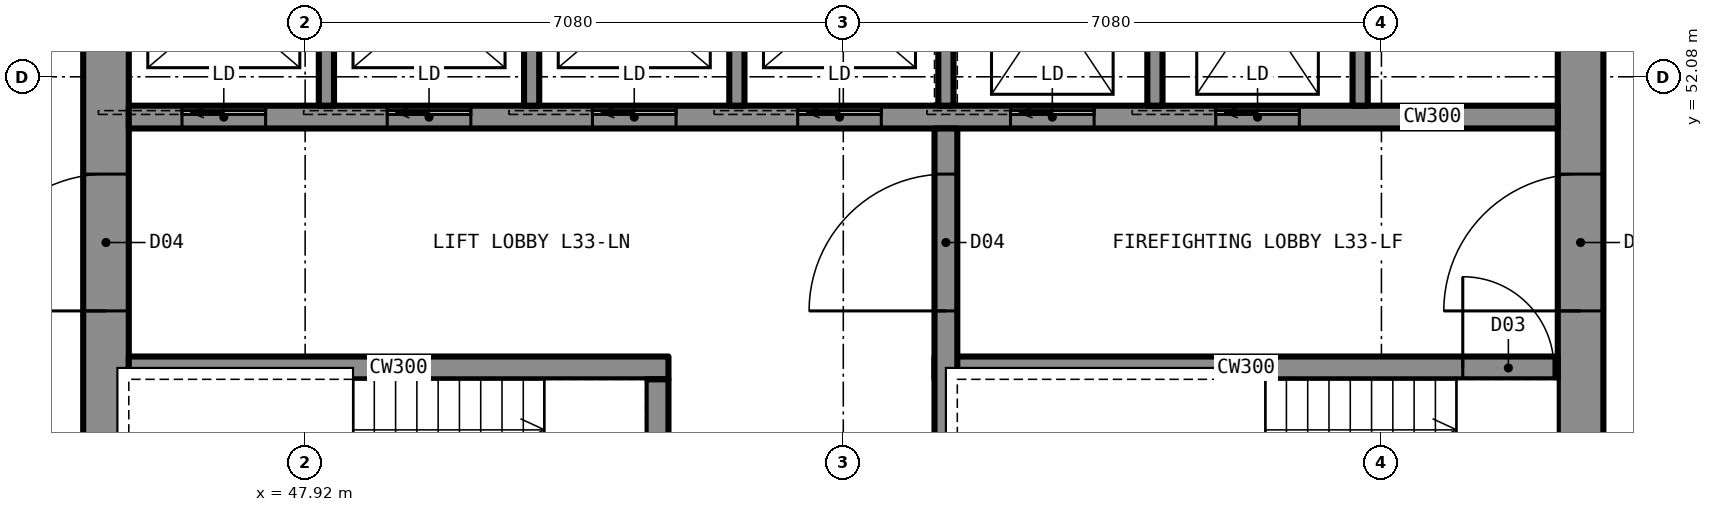
"""IFC4 building model, lengths in metres.
Left out: names, types, materials, properties, quantities, classifications, styles, units other than length and angle.
Written with IfcOpenShell. Run it as: python <this file> out.ifc"""

import sys

from ifc_helpers import new_model, si_unit, direction, frame, frame_2d, origin, place, context, subcontext, project, spatial, rectangle, extrude, element, fill, save


model = new_model("IFC4")
c1 = context("Model", 3, precision=1e-05, world=origin(), true_north=direction((0.0, 1.0)))
c2 = subcontext(c1, "Body", "Model", "MODEL_VIEW")
j1 = project(units=[si_unit("LENGTHUNIT", "METRE"), si_unit("PLANEANGLEUNIT", "RADIAN")], contexts=[c1])
p1 = place(None, origin())
s1 = spatial("IfcSite", under=j1, at=p1, CompositionType="ELEMENT")
p2 = place(p1, origin())
s2 = spatial("IfcBuilding", under=s1, at=p2, CompositionType="ELEMENT")
p3 = place(p2, frame((0.0, 0.0, 124.9)))
s3 = spatial("IfcBuildingStorey", under=s2, at=p3, CompositionType="ELEMENT", Elevation=124.9)
p4 = place(p3, frame((64.7, 35.6, 0.0), z_axis=(0.0, 0.0, 1.0), x_axis=(0.0, 1.0, 0.0)))
e1 = element("IfcWall", 1, at=p4, inside=s3, PredefinedType="SHEAR", context=c2, shape_type="SweptSolid", body=[
    extrude(rectangle(XDim=18.8, YDim=0.6, at=frame_2d((9.4, 0.0))), origin(), (0.0, 0.0, 1.0), 3.5),
])
p5 = place(p4, frame((13.4, 0.0, 0.0)))
e2 = element("IfcOpeningElement", 2, at=p5, cuts=e1, PredefinedType="OPENING", context=c2, shape_type="SweptSolid", body=[
    extrude(rectangle(XDim=1.8, YDim=2.2, at=frame_2d((0.9, 1.1))), frame((0.0, 0.31, 0.0), z_axis=(0.0, -1.0, 0.0), x_axis=(1.0, 0.0, 0.0)), (0.0, 0.0, 1.0), 0.62),
])
p6 = place(p4, frame((3.6, 0.0, 0.0)))
e3 = element("IfcOpeningElement", 3, at=p6, cuts=e1, PredefinedType="OPENING", context=c2, shape_type="SweptSolid", body=[
    extrude(rectangle(XDim=1.8, YDim=2.2, at=frame_2d((0.9, 1.1))), frame((0.0, 0.31, 0.0), z_axis=(0.0, -1.0, 0.0), x_axis=(1.0, 0.0, 0.0)), (0.0, 0.0, 1.0), 0.62),
])
p7 = place(p3, frame((45.3, 35.6, 0.0), z_axis=(0.0, 0.0, 1.0), x_axis=(0.0, 1.0, 0.0)))
e4 = element("IfcWall", 4, at=p7, inside=s3, PredefinedType="SHEAR", context=c2, shape_type="SweptSolid", body=[
    extrude(rectangle(XDim=18.8, YDim=0.6, at=frame_2d((9.4, 0.0))), origin(), (0.0, 0.0, 1.0), 3.5),
])
p8 = place(p7, frame((13.4, 0.0, 0.0)))
e5 = element("IfcOpeningElement", 5, at=p8, cuts=e4, PredefinedType="OPENING", context=c2, shape_type="SweptSolid", body=[
    extrude(rectangle(XDim=1.8, YDim=2.2, at=frame_2d((0.9, 1.1))), frame((0.0, 0.31, 0.0), z_axis=(0.0, -1.0, 0.0), x_axis=(1.0, 0.0, 0.0)), (0.0, 0.0, 1.0), 0.62),
])
p9 = place(p7, frame((3.6, 0.0, 0.0)))
e6 = element("IfcOpeningElement", 6, at=p9, cuts=e4, PredefinedType="OPENING", context=c2, shape_type="SweptSolid", body=[
    extrude(rectangle(XDim=1.8, YDim=2.2, at=frame_2d((0.9, 1.1))), frame((0.0, 0.31, 0.0), z_axis=(0.0, -1.0, 0.0), x_axis=(1.0, 0.0, 0.0)), (0.0, 0.0, 1.0), 0.62),
])
p10 = place(p7, frame((6.4, 0.0, 0.0)))
e7 = element("IfcOpeningElement", 7, at=p10, cuts=e4, PredefinedType="OPENING", context=c2, shape_type="SweptSolid", body=[
    extrude(rectangle(XDim=1.2, YDim=2.2, at=frame_2d((0.6, 1.1))), frame((0.0, 0.31, 0.0), z_axis=(0.0, -1.0, 0.0), x_axis=(1.0, 0.0, 0.0)), (0.0, 0.0, 1.0), 0.62),
])
p11 = place(p3, frame((45.6, 51.55, 0.0), z_axis=(0.0, 0.0, 1.0), x_axis=(1.0, 0.0, 0.0)))
e8 = element("IfcWall", 8, at=p11, inside=s3, PredefinedType="SHEAR", context=c2, shape_type="SweptSolid", body=[
    extrude(rectangle(XDim=18.8, YDim=0.3, at=frame_2d((9.4, 0.0))), origin(), (0.0, 0.0, 1.0), 3.5),
])
p12 = place(p11, frame((0.7, 0.0, 0.0)))
e9 = element("IfcOpeningElement", 9, at=p12, cuts=e8, PredefinedType="OPENING", context=c2, shape_type="SweptSolid", body=[
    extrude(rectangle(XDim=1.1, YDim=2.2, at=frame_2d((0.55, 1.1))), frame((0.0, 0.16, 0.0), z_axis=(0.0, -1.0, 0.0), x_axis=(1.0, 0.0, 0.0)), (0.0, 0.0, 1.0), 0.32),
])
p13 = place(p11, frame((3.4, 0.0, 0.0)))
e10 = element("IfcOpeningElement", 10, at=p13, cuts=e8, PredefinedType="OPENING", context=c2, shape_type="SweptSolid", body=[
    extrude(rectangle(XDim=1.1, YDim=2.2, at=frame_2d((0.55, 1.1))), frame((0.0, 0.16, 0.0), z_axis=(0.0, -1.0, 0.0), x_axis=(1.0, 0.0, 0.0)), (0.0, 0.0, 1.0), 0.32),
])
p14 = place(p11, frame((6.1, 0.0, 0.0)))
e11 = element("IfcOpeningElement", 11, at=p14, cuts=e8, PredefinedType="OPENING", context=c2, shape_type="SweptSolid", body=[
    extrude(rectangle(XDim=1.1, YDim=2.2, at=frame_2d((0.55, 1.1))), frame((0.0, 0.16, 0.0), z_axis=(0.0, -1.0, 0.0), x_axis=(1.0, 0.0, 0.0)), (0.0, 0.0, 1.0), 0.32),
])
p15 = place(p11, frame((8.8, 0.0, 0.0)))
e12 = element("IfcOpeningElement", 12, at=p15, cuts=e8, PredefinedType="OPENING", context=c2, shape_type="SweptSolid", body=[
    extrude(rectangle(XDim=1.1, YDim=2.2, at=frame_2d((0.55, 1.1))), frame((0.0, 0.16, 0.0), z_axis=(0.0, -1.0, 0.0), x_axis=(1.0, 0.0, 0.0)), (0.0, 0.0, 1.0), 0.32),
])
p16 = place(p11, frame((11.6, 0.0, 0.0)))
e13 = element("IfcOpeningElement", 13, at=p16, cuts=e8, PredefinedType="OPENING", context=c2, shape_type="SweptSolid", body=[
    extrude(rectangle(XDim=1.1, YDim=2.2, at=frame_2d((0.55, 1.1))), frame((0.0, 0.16, 0.0), z_axis=(0.0, -1.0, 0.0), x_axis=(1.0, 0.0, 0.0)), (0.0, 0.0, 1.0), 0.32),
])
p17 = place(p11, frame((14.3, 0.0, 0.0)))
e14 = element("IfcOpeningElement", 14, at=p17, cuts=e8, PredefinedType="OPENING", context=c2, shape_type="SweptSolid", body=[
    extrude(rectangle(XDim=1.1, YDim=2.2, at=frame_2d((0.55, 1.1))), frame((0.0, 0.16, 0.0), z_axis=(0.0, -1.0, 0.0), x_axis=(1.0, 0.0, 0.0)), (0.0, 0.0, 1.0), 0.32),
])
p18 = place(p3, frame((45.6, 48.25, 0.0), z_axis=(0.0, 0.0, 1.0), x_axis=(1.0, 0.0, 0.0)))
e15 = element("IfcWall", 15, at=p18, inside=s3, PredefinedType="SHEAR", context=c2, shape_type="SweptSolid", body=[
    extrude(rectangle(XDim=7.1, YDim=0.3, at=frame_2d((3.55, 0.0))), origin(), (0.0, 0.0, 1.0), 3.5),
])
p19 = place(p3, frame((56.2, 48.25, 0.0), z_axis=(0.0, 0.0, 1.0), x_axis=(1.0, 0.0, 0.0)))
e16 = element("IfcWall", 16, at=p19, inside=s3, PredefinedType="SHEAR", context=c2, shape_type="SweptSolid", body=[
    extrude(rectangle(XDim=8.2, YDim=0.3, at=frame_2d((4.1, 0.0))), origin(), (0.0, 0.0, 1.0), 3.5),
])
p20 = place(p19, frame((6.95, 0.0, 0.0)))
e17 = element("IfcOpeningElement", 17, at=p20, cuts=e16, PredefinedType="OPENING", context=c2, shape_type="SweptSolid", body=[
    extrude(rectangle(XDim=1.2, YDim=2.2, at=frame_2d((0.6, 1.1))), frame((0.0, 0.16, 0.0), z_axis=(0.0, -1.0, 0.0), x_axis=(1.0, 0.0, 0.0)), (0.0, 0.0, 1.0), 0.32),
])
p21 = place(p3, frame((52.55, 41.9, 0.0), z_axis=(0.0, 0.0, 1.0), x_axis=(0.0, 1.0, 0.0)))
e18 = element("IfcWall", 18, at=p21, inside=s3, PredefinedType="SHEAR", context=c2, shape_type="SweptSolid", body=[
    extrude(rectangle(XDim=6.2, YDim=0.3, at=frame_2d((3.1, 0.0))), origin(), (0.0, 0.0, 1.0), 3.5),
])
p22 = place(p21, frame((4.125, 0.0, 0.0)))
e19 = element("IfcOpeningElement", 19, at=p22, cuts=e18, PredefinedType="OPENING", context=c2, shape_type="SweptSolid", body=[
    extrude(rectangle(XDim=1.2, YDim=2.2, at=frame_2d((0.6, 1.1))), frame((0.0, 0.16, 0.0), z_axis=(0.0, -1.0, 0.0), x_axis=(1.0, 0.0, 0.0)), (0.0, 0.0, 1.0), 0.32),
])
p23 = place(p3, frame((56.35, 41.9, 0.0), z_axis=(0.0, 0.0, 1.0), x_axis=(0.0, 1.0, 0.0)))
e20 = element("IfcWall", 20, at=p23, inside=s3, PredefinedType="SHEAR", context=c2, shape_type="SweptSolid", body=[
    extrude(rectangle(XDim=9.5, YDim=0.3, at=frame_2d((4.75, 0.0))), origin(), (0.0, 0.0, 1.0), 3.5),
])
p24 = place(p23, frame((7.1, 0.0, 0.0)))
e21 = element("IfcOpeningElement", 21, at=p24, cuts=e20, PredefinedType="OPENING", context=c2, shape_type="SweptSolid", body=[
    extrude(rectangle(XDim=1.8, YDim=2.2, at=frame_2d((0.9, 1.1))), frame((0.0, 0.16, 0.0), z_axis=(0.0, -1.0, 0.0), x_axis=(1.0, 0.0, 0.0)), (0.0, 0.0, 1.0), 0.32),
])
for number, where, z_axis, x_axis in (
    (22, (48.2, 51.7, 0.0), (0.0, 0.0, 1.0), (0.0, 1.0, 0.0)),
    (23, (50.9, 51.7, 0.0), (0.0, 0.0, 1.0), (0.0, 1.0, 0.0)),
    (24, (53.6, 51.7, 0.0), (0.0, 0.0, 1.0), (0.0, 1.0, 0.0)),
    (25, (59.1, 51.7, 0.0), (0.0, 0.0, 1.0), (0.0, 1.0, 0.0)),
    (26, (61.8, 51.7, 0.0), (0.0, 0.0, 1.0), (0.0, 1.0, 0.0)),
    (27, (56.35, 51.7, 0.0), (0.0, 0.0, 1.0), (0.0, 1.0, 0.0)),
):
    element("IfcWall", number, at=place(p3, frame(where, z_axis=z_axis, x_axis=x_axis)), inside=s3, PredefinedType="PARTITIONING", context=c2, shape_type="SweptSolid", body=[
        extrude(rectangle(XDim=2.7, YDim=0.2, at=frame_2d((1.35, 0.0))), origin(), (0.0, 0.0, 1.0), 3.33),
    ])
p25 = place(p8, origin())
e28 = element("IfcDoor", 28, at=p25, inside=s3, OperationType="DOUBLE_DOOR_SINGLE_SWING", PredefinedType="DOOR", context=c2, shape_type="SweptSolid", body=[
    extrude(rectangle(XDim=1.8, YDim=2.2, at=frame_2d((0.9, 1.1))), frame((0.0, 0.025, 0.0), z_axis=(0.0, -1.0, 0.0), x_axis=(1.0, 0.0, 0.0)), (0.0, 0.0, 1.0), 0.05),
])
fill(e5, e28)
p26 = place(p5, origin())
e29 = element("IfcDoor", 29, at=p26, inside=s3, OperationType="DOUBLE_DOOR_SINGLE_SWING", PredefinedType="DOOR", context=c2, shape_type="SweptSolid", body=[
    extrude(rectangle(XDim=1.8, YDim=2.2, at=frame_2d((0.9, 1.1))), frame((0.0, 0.025, 0.0), z_axis=(0.0, -1.0, 0.0), x_axis=(1.0, 0.0, 0.0)), (0.0, 0.0, 1.0), 0.05),
])
fill(e2, e29)
p27 = place(p24, origin())
e30 = element("IfcDoor", 30, at=p27, inside=s3, OperationType="DOUBLE_DOOR_SINGLE_SWING", PredefinedType="DOOR", context=c2, shape_type="SweptSolid", body=[
    extrude(rectangle(XDim=1.8, YDim=2.2, at=frame_2d((0.9, 1.1))), frame((0.0, 0.025, 0.0), z_axis=(0.0, -1.0, 0.0), x_axis=(1.0, 0.0, 0.0)), (0.0, 0.0, 1.0), 0.05),
])
fill(e21, e30)
p28 = place(p20, origin())
e31 = element("IfcDoor", 31, at=p28, inside=s3, OperationType="SINGLE_SWING_LEFT", PredefinedType="DOOR", context=c2, shape_type="SweptSolid", body=[
    extrude(rectangle(XDim=1.2, YDim=2.2, at=frame_2d((0.6, 1.1))), frame((0.0, 0.025, 0.0), z_axis=(0.0, -1.0, 0.0), x_axis=(1.0, 0.0, 0.0)), (0.0, 0.0, 1.0), 0.05),
])
fill(e17, e31)
p29 = place(p12, origin())
e32 = element("IfcDoor", 32, at=p29, inside=s3, OperationType="SLIDING_TO_LEFT", PredefinedType="DOOR", context=c2, shape_type="SweptSolid", body=[
    extrude(rectangle(XDim=1.1, YDim=2.2, at=frame_2d((0.55, 1.1))), frame((0.0, 0.025, 0.0), z_axis=(0.0, -1.0, 0.0), x_axis=(1.0, 0.0, 0.0)), (0.0, 0.0, 1.0), 0.05),
])
fill(e9, e32)
p30 = place(p13, origin())
e33 = element("IfcDoor", 33, at=p30, inside=s3, OperationType="SLIDING_TO_LEFT", PredefinedType="DOOR", context=c2, shape_type="SweptSolid", body=[
    extrude(rectangle(XDim=1.1, YDim=2.2, at=frame_2d((0.55, 1.1))), frame((0.0, 0.025, 0.0), z_axis=(0.0, -1.0, 0.0), x_axis=(1.0, 0.0, 0.0)), (0.0, 0.0, 1.0), 0.05),
])
fill(e10, e33)
p31 = place(p14, origin())
e34 = element("IfcDoor", 34, at=p31, inside=s3, OperationType="SLIDING_TO_LEFT", PredefinedType="DOOR", context=c2, shape_type="SweptSolid", body=[
    extrude(rectangle(XDim=1.1, YDim=2.2, at=frame_2d((0.55, 1.1))), frame((0.0, 0.025, 0.0), z_axis=(0.0, -1.0, 0.0), x_axis=(1.0, 0.0, 0.0)), (0.0, 0.0, 1.0), 0.05),
])
fill(e11, e34)
p32 = place(p15, origin())
e35 = element("IfcDoor", 35, at=p32, inside=s3, OperationType="SLIDING_TO_LEFT", PredefinedType="DOOR", context=c2, shape_type="SweptSolid", body=[
    extrude(rectangle(XDim=1.1, YDim=2.2, at=frame_2d((0.55, 1.1))), frame((0.0, 0.025, 0.0), z_axis=(0.0, -1.0, 0.0), x_axis=(1.0, 0.0, 0.0)), (0.0, 0.0, 1.0), 0.05),
])
fill(e12, e35)
p33 = place(p16, origin())
e36 = element("IfcDoor", 36, at=p33, inside=s3, OperationType="SLIDING_TO_LEFT", PredefinedType="DOOR", context=c2, shape_type="SweptSolid", body=[
    extrude(rectangle(XDim=1.1, YDim=2.2, at=frame_2d((0.55, 1.1))), frame((0.0, 0.025, 0.0), z_axis=(0.0, -1.0, 0.0), x_axis=(1.0, 0.0, 0.0)), (0.0, 0.0, 1.0), 0.05),
])
fill(e13, e36)
p34 = place(p17, origin())
e37 = element("IfcDoor", 37, at=p34, inside=s3, OperationType="SLIDING_TO_LEFT", PredefinedType="DOOR", context=c2, shape_type="SweptSolid", body=[
    extrude(rectangle(XDim=1.1, YDim=2.2, at=frame_2d((0.55, 1.1))), frame((0.0, 0.025, 0.0), z_axis=(0.0, -1.0, 0.0), x_axis=(1.0, 0.0, 0.0)), (0.0, 0.0, 1.0), 0.05),
])
fill(e14, e37)
save(model, sys.argv[1])
